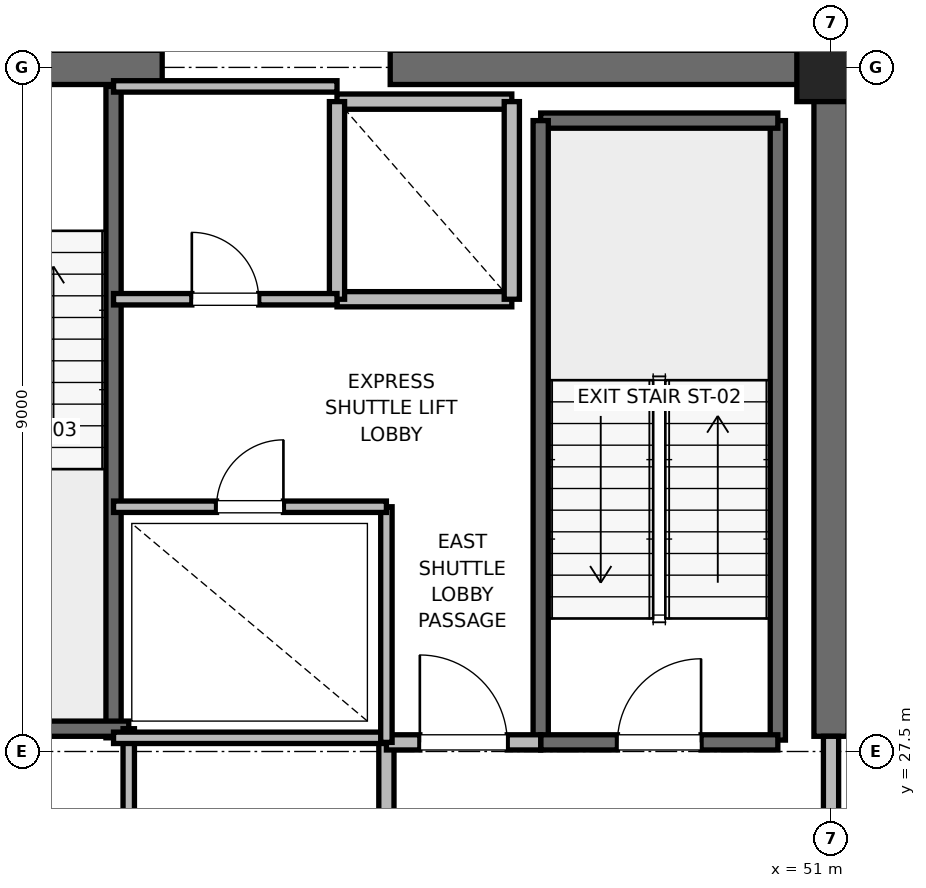
"""IFC4 building model, lengths in metres.
Left out: names, types, materials, properties, quantities, classifications, styles, units other than length and angle.
Written with IfcOpenShell. Run it as: python <this file> out.ifc"""

import sys

from ifc_helpers import new_model, si_unit, direction, frame, frame_2d, origin, origin_2d, place, context, subcontext, project, spatial, rectangle, extrude, element, fill, save


model = new_model("IFC4")
c1 = context("Model", 3, precision=1e-05, world=origin(), true_north=direction((0.0, 1.0)))
c2 = subcontext(c1, "Body", "Model", "MODEL_VIEW")
j1 = project(units=[si_unit("LENGTHUNIT", "METRE"), si_unit("PLANEANGLEUNIT", "RADIAN")], contexts=[c1])
p1 = place(None, origin())
s1 = spatial("IfcSite", under=j1, at=p1, CompositionType="ELEMENT")
p2 = place(p1, origin())
s2 = spatial("IfcBuilding", under=s1, at=p2, CompositionType="ELEMENT")
p3 = place(p2, frame((0.0, 0.0, 275.2)))
s3 = spatial("IfcBuildingStorey", under=s2, at=p3, CompositionType="ELEMENT", Elevation=275.2)
p4 = place(p3, frame((51.0, 36.5, 0.0), z_axis=(0.0, 0.0, 1.0), x_axis=(1.0, 0.0, 0.0)))
e1 = element("IfcColumn", 1, at=p4, inside=s3, PredefinedType="PILASTER", context=c2, shape_type="SweptSolid", body=[
    extrude(rectangle(XDim=0.9, YDim=0.9, at=origin_2d()), origin(), (0.0, 0.0, 1.0), 4.0),
])
p5 = place(p3, frame((37.8, 36.5, 0.0), z_axis=(0.0, 0.0, 1.0), x_axis=(1.0, 0.0, 0.0)))
e2 = element("IfcWall", 2, at=p5, inside=s3, PredefinedType="SHEAR", context=c2, shape_type="SweptSolid", body=[
    extrude(rectangle(XDim=4.4, YDim=0.45, at=frame_2d((2.2, 0.0))), origin(), (0.0, 0.0, 1.0), 3.785),
])
p6 = place(p5, frame((1.65, 0.0, 0.0)))
e3 = element("IfcOpeningElement", 3, at=p6, cuts=e2, PredefinedType="OPENING", context=c2, shape_type="SweptSolid", body=[
    extrude(rectangle(XDim=1.1, YDim=2.15, at=frame_2d((0.55, 1.075))), frame((0.0, 0.225, 0.0), z_axis=(0.0, -1.0, 0.0), x_axis=(1.0, 0.0, 0.0)), (0.0, 0.0, 1.0), 0.45),
])
p7 = place(p3, frame((45.2, 36.5, 0.0), z_axis=(0.0, 0.0, 1.0), x_axis=(1.0, 0.0, 0.0)))
e4 = element("IfcWall", 4, at=p7, inside=s3, PredefinedType="SHEAR", context=c2, shape_type="SweptSolid", body=[
    extrude(rectangle(XDim=5.8, YDim=0.45, at=frame_2d((2.9, 0.0))), origin(), (0.0, 0.0, 1.0), 3.785),
])
p8 = place(p3, frame((51.0, 27.7, 0.0), z_axis=(0.0, 0.0, 1.0), x_axis=(0.0, 1.0, 0.0)))
e5 = element("IfcWall", 5, at=p8, inside=s3, PredefinedType="SHEAR", context=c2, shape_type="SweptSolid", body=[
    extrude(rectangle(XDim=8.8, YDim=0.45, at=frame_2d((4.4, 0.0))), origin(), (0.0, 0.0, 1.0), 3.785),
])
p9 = place(p3, frame((50.3, 27.65, 0.0), z_axis=(0.0, 0.0, 1.0), x_axis=(0.0, 1.0, 0.0)))
e6 = element("IfcWall", 6, at=p9, inside=s3, PredefinedType="SOLIDWALL", context=c2, shape_type="SweptSolid", body=[
    extrude(rectangle(XDim=8.15, YDim=0.2, at=frame_2d((4.075, 0.0))), origin(), (0.0, 0.0, 1.0), 3.785),
])
p10 = place(p3, frame((47.18, 35.8, 0.0), z_axis=(0.0, 0.0, 1.0), x_axis=(1.0, 0.0, 0.0)))
e7 = element("IfcWall", 7, at=p10, inside=s3, PredefinedType="SOLIDWALL", context=c2, shape_type="SweptSolid", body=[
    extrude(rectangle(XDim=3.12, YDim=0.2, at=frame_2d((1.56, 0.0))), origin(), (0.0, 0.0, 1.0), 3.785),
])
p11 = place(p3, frame((47.18, 27.62, 0.0), z_axis=(0.0, 0.0, 1.0), x_axis=(0.0, 1.0, 0.0)))
e8 = element("IfcWall", 8, at=p11, inside=s3, PredefinedType="SOLIDWALL", context=c2, shape_type="SweptSolid", body=[
    extrude(rectangle(XDim=8.18, YDim=0.2, at=frame_2d((4.09, 0.0))), origin(), (0.0, 0.0, 1.0), 3.785),
])
p12 = place(p3, frame((47.18, 27.62, 0.0), z_axis=(0.0, 0.0, 1.0), x_axis=(1.0, 0.0, 0.0)))
e9 = element("IfcWall", 9, at=p12, inside=s3, PredefinedType="SOLIDWALL", context=c2, shape_type="SweptSolid", body=[
    extrude(rectangle(XDim=3.12, YDim=0.2, at=frame_2d((1.56, 0.0))), origin(), (0.0, 0.0, 1.0), 3.785),
])
p13 = place(p12, frame((1.01, 0.0, 0.0)))
e10 = element("IfcOpeningElement", 10, at=p13, cuts=e9, PredefinedType="OPENING", context=c2, shape_type="SweptSolid", body=[
    extrude(rectangle(XDim=1.1, YDim=2.15, at=frame_2d((0.55, 1.075))), frame((0.0, 0.1, 0.0), z_axis=(0.0, -1.0, 0.0), x_axis=(1.0, 0.0, 0.0)), (0.0, 0.0, 1.0), 0.2),
])
p14 = place(p3, frame((41.56, 27.68, 0.0), z_axis=(0.0, 0.0, 1.0), x_axis=(0.0, 1.0, 0.0)))
e11 = element("IfcWall", 11, at=p14, inside=s3, PredefinedType="SOLIDWALL", context=c2, shape_type="SweptSolid", body=[
    extrude(rectangle(XDim=8.57, YDim=0.2, at=frame_2d((4.285, 0.0))), origin(), (0.0, 0.0, 1.0), 3.785),
])
p15 = place(p3, frame((38.44, 27.8, 0.0), z_axis=(0.0, 0.0, 1.0), x_axis=(1.0, 0.0, 0.0)))
e12 = element("IfcWall", 12, at=p15, inside=s3, PredefinedType="SOLIDWALL", context=c2, shape_type="SweptSolid", body=[
    extrude(rectangle(XDim=3.32, YDim=0.2, at=frame_2d((1.66, 0.0))), origin(), (0.0, 0.0, 1.0), 3.785),
])
p16 = place(p3, frame((45.15, 24.25, 0.0), z_axis=(0.0, 0.0, 1.0), x_axis=(0.0, 1.0, 0.0)))
e13 = element("IfcWall", 13, at=p16, inside=s3, PredefinedType="PARTITIONING", context=c2, shape_type="SweptSolid", body=[
    extrude(rectangle(XDim=3.37, YDim=0.2, at=frame_2d((1.685, 0.0))), origin(), (0.0, 0.0, 1.0), 3.785),
])
p17 = place(p3, frame((45.15, 27.62, 0.0), z_axis=(0.0, 0.0, 1.0), x_axis=(1.0, 0.0, 0.0)))
e14 = element("IfcWall", 14, at=p17, inside=s3, PredefinedType="PARTITIONING", context=c2, shape_type="SweptSolid", body=[
    extrude(rectangle(XDim=2.03, YDim=0.2, at=frame_2d((1.015, 0.0))), origin(), (0.0, 0.0, 1.0), 3.785),
])
p18 = place(p17, frame((0.44, 0.0, 0.0)))
e15 = element("IfcOpeningElement", 15, at=p18, cuts=e14, PredefinedType="OPENING", context=c2, shape_type="SweptSolid", body=[
    extrude(rectangle(XDim=1.15, YDim=2.2, at=frame_2d((0.575, 1.1))), frame((0.0, 0.1, 0.0), z_axis=(0.0, -1.0, 0.0), x_axis=(1.0, 0.0, 0.0)), (0.0, 0.0, 1.0), 0.2),
])
p19 = place(p3, frame((51.0, 24.3, 0.0), z_axis=(0.0, 0.0, 1.0), x_axis=(0.0, 1.0, 0.0)))
e16 = element("IfcWall", 16, at=p19, inside=s3, PredefinedType="PARTITIONING", context=c2, shape_type="SweptSolid", body=[
    extrude(rectangle(XDim=3.4, YDim=0.2, at=frame_2d((1.7, 0.0))), origin(), (0.0, 0.0, 1.0), 2.865),
])
p20 = place(p19, frame((1.125, 0.0, 0.0)))
e17 = element("IfcOpeningElement", 17, at=p20, cuts=e16, PredefinedType="OPENING", context=c2, shape_type="SweptSolid", body=[
    extrude(rectangle(XDim=1.15, YDim=2.2, at=frame_2d((0.575, 1.1))), frame((0.0, 0.1, 0.0), z_axis=(0.0, -1.0, 0.0), x_axis=(1.0, 0.0, 0.0)), (0.0, 0.0, 1.0), 0.2),
])
p21 = place(p3, frame((44.5, 33.45, 0.0), z_axis=(0.0, 0.0, 1.0), x_axis=(1.0, 0.0, 0.0)))
e18 = element("IfcWall", 18, at=p21, inside=s3, PredefinedType="SOLIDWALL", context=c2, shape_type="SweptSolid", body=[
    extrude(rectangle(XDim=2.3, YDim=0.2, at=frame_2d((1.15, 0.0))), origin(), (0.0, 0.0, 1.0), 3.785),
])
p22 = place(p3, frame((46.8, 36.05, 0.0), z_axis=(0.0, 0.0, 1.0), x_axis=(-1.0, 0.0, 0.0)))
e19 = element("IfcWall", 19, at=p22, inside=s3, PredefinedType="SOLIDWALL", context=c2, shape_type="SweptSolid", body=[
    extrude(rectangle(XDim=2.3, YDim=0.2, at=frame_2d((1.15, 0.0))), origin(), (0.0, 0.0, 1.0), 2.865),
])
p23 = place(p3, frame((44.5, 36.05, 0.0), z_axis=(0.0, 0.0, 1.0), x_axis=(0.0, -1.0, 0.0)))
e20 = element("IfcWall", 20, at=p23, inside=s3, PredefinedType="SOLIDWALL", context=c2, shape_type="SweptSolid", body=[
    extrude(rectangle(XDim=2.6, YDim=0.2, at=frame_2d((1.3, 0.0))), origin(), (0.0, 0.0, 1.0), 2.865),
])
p24 = place(p3, frame((46.8, 33.45, 0.0), z_axis=(0.0, 0.0, 1.0), x_axis=(0.0, 1.0, 0.0)))
e21 = element("IfcWall", 21, at=p24, inside=s3, PredefinedType="SOLIDWALL", context=c2, shape_type="SweptSolid", body=[
    extrude(rectangle(XDim=2.6, YDim=0.2, at=frame_2d((1.3, 0.0))), origin(), (0.0, 0.0, 1.0), 3.785),
])
p25 = place(p3, frame((41.76, 23.8, 0.0), z_axis=(0.0, 0.0, 1.0), x_axis=(0.0, 1.0, 0.0)))
e22 = element("IfcWall", 22, at=p25, inside=s3, PredefinedType="PARTITIONING", context=c2, shape_type="SweptSolid", body=[
    extrude(rectangle(XDim=4.0, YDim=0.15, at=frame_2d((2.0, 0.0))), origin(), (0.0, 0.0, 1.0), 2.85),
])
p26 = place(p3, frame((41.56, 27.68, 0.0), z_axis=(0.0, 0.0, 1.0), x_axis=(1.0, 0.0, 0.0)))
e23 = element("IfcWall", 23, at=p26, inside=s3, PredefinedType="PARTITIONING", context=c2, shape_type="SweptSolid", body=[
    extrude(rectangle(XDim=3.59, YDim=0.15, at=frame_2d((1.795, 0.0))), origin(), (0.0, 0.0, 1.0), 2.85),
])
p27 = place(p3, frame((45.15, 27.62, 0.0), z_axis=(0.0, 0.0, 1.0), x_axis=(0.0, 1.0, 0.0)))
e24 = element("IfcWall", 24, at=p27, inside=s3, PredefinedType="PARTITIONING", context=c2, shape_type="SweptSolid", body=[
    extrude(rectangle(XDim=3.1, YDim=0.15, at=frame_2d((1.55, 0.0))), origin(), (0.0, 0.0, 1.0), 2.85),
])
p28 = place(p3, frame((41.56, 30.72, 0.0), z_axis=(0.0, 0.0, 1.0), x_axis=(1.0, 0.0, 0.0)))
e25 = element("IfcWall", 25, at=p28, inside=s3, PredefinedType="PARTITIONING", context=c2, shape_type="SweptSolid", body=[
    extrude(rectangle(XDim=3.59, YDim=0.15, at=frame_2d((1.795, 0.0))), origin(), (0.0, 0.0, 1.0), 2.85),
])
p29 = place(p28, frame((1.355, 0.0, 0.0)))
e26 = element("IfcOpeningElement", 26, at=p29, cuts=e25, PredefinedType="OPENING", context=c2, shape_type="SweptSolid", body=[
    extrude(rectangle(XDim=0.88, YDim=2.1, at=frame_2d((0.44, 1.05))), frame((0.0, 0.075, 0.0), z_axis=(0.0, -1.0, 0.0), x_axis=(1.0, 0.0, 0.0)), (0.0, 0.0, 1.0), 0.15),
])
p30 = place(p3, frame((41.56, 36.25, 0.0), z_axis=(0.0, 0.0, 1.0), x_axis=(1.0, 0.0, 0.0)))
e27 = element("IfcWall", 27, at=p30, inside=s3, PredefinedType="PARTITIONING", context=c2, shape_type="SweptSolid", body=[
    extrude(rectangle(XDim=2.94, YDim=0.15, at=frame_2d((1.47, 0.0))), origin(), (0.0, 0.0, 1.0), 2.85),
])
p31 = place(p3, frame((41.56, 33.45, 0.0), z_axis=(0.0, 0.0, 1.0), x_axis=(1.0, 0.0, 0.0)))
e28 = element("IfcWall", 28, at=p31, inside=s3, PredefinedType="PARTITIONING", context=c2, shape_type="SweptSolid", body=[
    extrude(rectangle(XDim=2.94, YDim=0.15, at=frame_2d((1.47, 0.0))), origin(), (0.0, 0.0, 1.0), 2.85),
])
p32 = place(p31, frame((1.03, 0.0, 0.0)))
e29 = element("IfcOpeningElement", 29, at=p32, cuts=e28, PredefinedType="OPENING", context=c2, shape_type="SweptSolid", body=[
    extrude(rectangle(XDim=0.88, YDim=2.1, at=frame_2d((0.44, 1.05))), frame((0.0, 0.075, 0.0), z_axis=(0.0, -1.0, 0.0), x_axis=(1.0, 0.0, 0.0)), (0.0, 0.0, 1.0), 0.15),
])
p33 = place(p13, origin())
e30 = element("IfcDoor", 30, at=p33, inside=s3, OperationType="SINGLE_SWING_RIGHT", PredefinedType="DOOR", context=c2, shape_type="SweptSolid", body=[
    extrude(rectangle(XDim=1.1, YDim=2.15, at=frame_2d((0.55, 1.075))), frame((0.0, 0.025, 0.0), z_axis=(0.0, -1.0, 0.0), x_axis=(1.0, 0.0, 0.0)), (0.0, 0.0, 1.0), 0.05),
])
fill(e10, e30)
p34 = place(p18, origin())
e31 = element("IfcDoor", 31, at=p34, inside=s3, OperationType="SINGLE_SWING_LEFT", PredefinedType="DOOR", context=c2, shape_type="SweptSolid", body=[
    extrude(rectangle(XDim=1.15, YDim=2.2, at=frame_2d((0.575, 1.1))), frame((0.0, 0.025, 0.0), z_axis=(0.0, -1.0, 0.0), x_axis=(1.0, 0.0, 0.0)), (0.0, 0.0, 1.0), 0.05),
])
fill(e15, e31)
p35 = place(p29, origin())
e32 = element("IfcDoor", 32, at=p35, inside=s3, OperationType="SINGLE_SWING_RIGHT", PredefinedType="DOOR", context=c2, shape_type="SweptSolid", body=[
    extrude(rectangle(XDim=0.88, YDim=2.1, at=frame_2d((0.44, 1.05))), frame((0.0, 0.025, 0.0), z_axis=(0.0, -1.0, 0.0), x_axis=(1.0, 0.0, 0.0)), (0.0, 0.0, 1.0), 0.05),
])
fill(e26, e32)
p36 = place(p32, origin())
e33 = element("IfcDoor", 33, at=p36, inside=s3, OperationType="SINGLE_SWING_LEFT", PredefinedType="DOOR", context=c2, shape_type="SweptSolid", body=[
    extrude(rectangle(XDim=0.88, YDim=2.1, at=frame_2d((0.44, 1.05))), frame((0.0, 0.025, 0.0), z_axis=(0.0, -1.0, 0.0), x_axis=(1.0, 0.0, 0.0)), (0.0, 0.0, 1.0), 0.05),
])
fill(e29, e33)
save(model, sys.argv[1])
